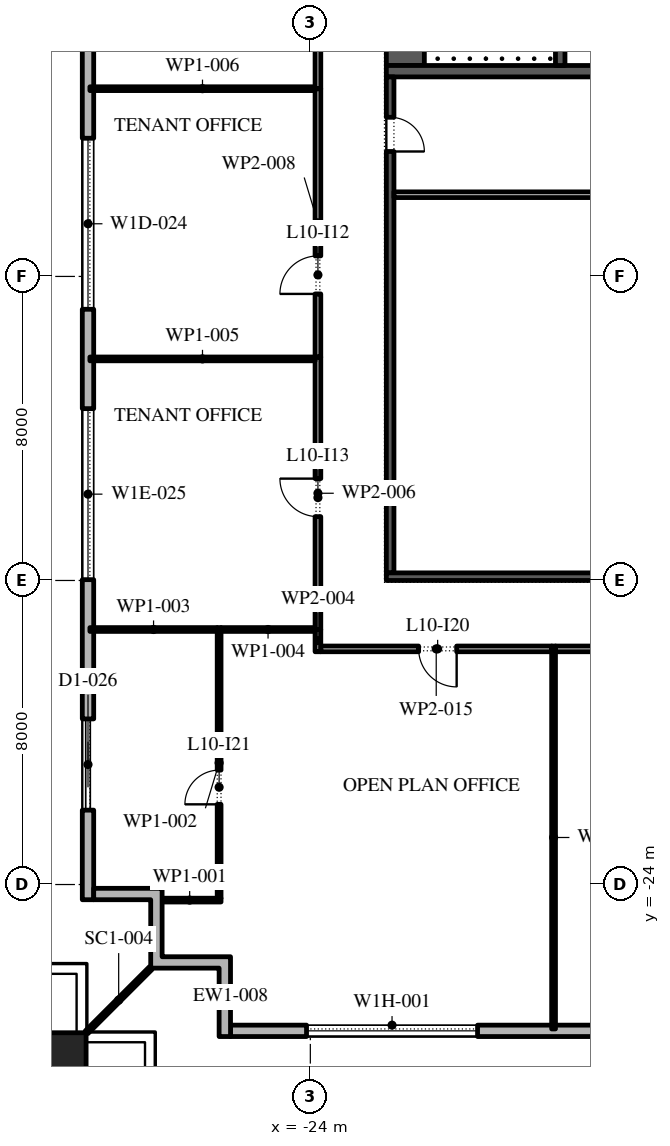
"""IFC4 building model, lengths in metres.
Left out: names, types, materials, properties, quantities, classifications, styles, units other than length and angle.
Written with IfcOpenShell. Run it as: python <this file> out.ifc"""

import sys

from ifc_helpers import new_model, si_unit, direction, frame, frame_2d, origin, origin_2d, place, context, subcontext, project, spatial, polyline, rectangle, outline, extrude, element, fill, save


model = new_model("IFC4")
c1 = context("Model", 3, precision=1e-05, world=origin(), true_north=direction((0.0, 1.0)))
c2 = subcontext(c1, "Body", "Model", "MODEL_VIEW")
j1 = project(units=[si_unit("LENGTHUNIT", "METRE"), si_unit("PLANEANGLEUNIT", "RADIAN")], contexts=[c1])
p1 = place(None, origin())
s1 = spatial("IfcSite", under=j1, at=p1, CompositionType="ELEMENT")
p2 = place(p1, origin())
s2 = spatial("IfcBuilding", under=s1, at=p2, CompositionType="ELEMENT")
p3 = place(p2, frame((0.0, 0.0, 52.2)))
s3 = spatial("IfcBuildingStorey", under=s2, at=p3, CompositionType="ELEMENT", Elevation=52.2)
p4 = place(p3, frame((-30.6, -28.6, 0.0), z_axis=(0.0, 0.0, 1.0), x_axis=(1.0, 0.0, 0.0)))
e1 = element("IfcColumn", 1, at=p4, inside=s3, PredefinedType="COLUMN", context=c2, shape_type="SweptSolid", body=[
    extrude(rectangle(XDim=1.4, YDim=1.4, at=origin_2d()), origin(), (0.0, 0.0, 1.0), 4.2),
])
p5 = place(p3, frame((-26.1, -27.85, 0.0), z_axis=(0.0, 0.0, 1.0), x_axis=(1.0, 0.0, 0.0)))
e2 = element("IfcWall", 2, at=p5, inside=s3, PredefinedType="STANDARD", context=c2, shape_type="SweptSolid", body=[
    extrude(rectangle(XDim=52.5, YDim=0.3, at=frame_2d((26.25, 0.0))), origin(), (0.0, 0.0, 1.0), 4.0),
])
p6 = place(p5, frame((2.0, 0.0, 0.45)))
e3 = element("IfcOpeningElement", 3, at=p6, cuts=e2, PredefinedType="OPENING", context=c2, shape_type="SweptSolid", body=[
    extrude(rectangle(XDim=4.5, YDim=2.75, at=frame_2d((2.25, 1.375))), frame((0.0, 0.16, 0.0), z_axis=(0.0, -1.0, 0.0), x_axis=(1.0, 0.0, 0.0)), (0.0, 0.0, 1.0), 0.32),
])
p7 = place(p5, frame((10.65, 0.0, 0.45)))
e4 = element("IfcOpeningElement", 4, at=p7, cuts=e2, PredefinedType="OPENING", context=c2, shape_type="SweptSolid", body=[
    extrude(rectangle(XDim=4.5, YDim=2.75, at=frame_2d((2.25, 1.375))), frame((0.0, 0.16, 0.0), z_axis=(0.0, -1.0, 0.0), x_axis=(1.0, 0.0, 0.0)), (0.0, 0.0, 1.0), 0.32),
])
p8 = place(p5, frame((20.5, 0.0, 0.0)))
e5 = element("IfcOpeningElement", 5, at=p8, cuts=e2, PredefinedType="OPENING", context=c2, shape_type="SweptSolid", body=[
    extrude(rectangle(XDim=2.4, YDim=3.5, at=frame_2d((1.2, 1.75))), frame((0.0, 0.16, 0.0), z_axis=(0.0, -1.0, 0.0), x_axis=(1.0, 0.0, 0.0)), (0.0, 0.0, 1.0), 0.32),
])
p9 = place(p5, frame((28.25, 0.0, 0.45)))
e6 = element("IfcOpeningElement", 6, at=p9, cuts=e2, PredefinedType="OPENING", context=c2, shape_type="SweptSolid", body=[
    extrude(rectangle(XDim=4.5, YDim=2.75, at=frame_2d((2.25, 1.375))), frame((0.0, 0.16, 0.0), z_axis=(0.0, -1.0, 0.0), x_axis=(1.0, 0.0, 0.0)), (0.0, 0.0, 1.0), 0.32),
])
p10 = place(p5, frame((37.05, 0.0, 0.45)))
e7 = element("IfcOpeningElement", 7, at=p10, cuts=e2, PredefinedType="OPENING", context=c2, shape_type="SweptSolid", body=[
    extrude(rectangle(XDim=4.5, YDim=2.75, at=frame_2d((2.25, 1.375))), frame((0.0, 0.16, 0.0), z_axis=(0.0, -1.0, 0.0), x_axis=(1.0, 0.0, 0.0)), (0.0, 0.0, 1.0), 0.32),
])
p11 = place(p5, frame((45.85, 0.0, 0.45)))
e8 = element("IfcOpeningElement", 8, at=p11, cuts=e2, PredefinedType="OPENING", context=c2, shape_type="SweptSolid", body=[
    extrude(rectangle(XDim=4.5, YDim=2.75, at=frame_2d((2.25, 1.375))), frame((0.0, 0.16, 0.0), z_axis=(0.0, -1.0, 0.0), x_axis=(1.0, 0.0, 0.0)), (0.0, 0.0, 1.0), 0.32),
])
p12 = place(p3, frame((-29.85, 25.1, 0.0), z_axis=(0.0, 0.0, 1.0), x_axis=(0.0, -1.0, 0.0)))
e9 = element("IfcWall", 9, at=p12, inside=s3, PredefinedType="STANDARD", context=c2, shape_type="SweptSolid", body=[
    extrude(rectangle(XDim=49.5, YDim=0.3, at=frame_2d((24.75, 0.0))), origin(), (0.0, 0.0, 1.0), 4.0),
])
p13 = place(p12, frame((1.157, 0.0, 0.45)))
e10 = element("IfcOpeningElement", 10, at=p13, cuts=e9, PredefinedType="OPENING", context=c2, shape_type="SweptSolid", body=[
    extrude(rectangle(XDim=4.5, YDim=2.875, at=frame_2d((2.25, 1.438))), frame((0.0, 0.16, 0.0), z_axis=(0.0, -1.0, 0.0), x_axis=(1.0, 0.0, 0.0)), (0.0, 0.0, 1.0), 0.32),
])
p14 = place(p12, frame((8.121, 0.0, 0.45)))
e11 = element("IfcOpeningElement", 11, at=p14, cuts=e9, PredefinedType="OPENING", context=c2, shape_type="SweptSolid", body=[
    extrude(rectangle(XDim=4.5, YDim=3.05, at=frame_2d((2.25, 1.525))), frame((0.0, 0.16, 0.0), z_axis=(0.0, -1.0, 0.0), x_axis=(1.0, 0.0, 0.0)), (0.0, 0.0, 1.0), 0.32),
])
p15 = place(p12, frame((16.286, 0.0, 0.0)))
e12 = element("IfcOpeningElement", 12, at=p15, cuts=e9, PredefinedType="OPENING", context=c2, shape_type="SweptSolid", body=[
    extrude(rectangle(XDim=2.4, YDim=3.325, at=frame_2d((1.2, 1.663))), frame((0.0, 0.16, 0.0), z_axis=(0.0, -1.0, 0.0), x_axis=(1.0, 0.0, 0.0)), (0.0, 0.0, 1.0), 0.32),
])
p16 = place(p12, frame((22.35, 0.0, 0.45)))
e13 = element("IfcOpeningElement", 13, at=p16, cuts=e9, PredefinedType="OPENING", context=c2, shape_type="SweptSolid", body=[
    extrude(rectangle(XDim=4.5, YDim=2.875, at=frame_2d((2.25, 1.438))), frame((0.0, 0.16, 0.0), z_axis=(0.0, -1.0, 0.0), x_axis=(1.0, 0.0, 0.0)), (0.0, 0.0, 1.0), 0.32),
])
p17 = place(p12, frame((29.464, 0.0, 0.45)))
e14 = element("IfcOpeningElement", 14, at=p17, cuts=e9, PredefinedType="OPENING", context=c2, shape_type="SweptSolid", body=[
    extrude(rectangle(XDim=4.5, YDim=2.875, at=frame_2d((2.25, 1.438))), frame((0.0, 0.16, 0.0), z_axis=(0.0, -1.0, 0.0), x_axis=(1.0, 0.0, 0.0)), (0.0, 0.0, 1.0), 0.32),
])
p18 = place(p12, frame((36.579, 0.0, 0.45)))
e15 = element("IfcOpeningElement", 15, at=p18, cuts=e9, PredefinedType="OPENING", context=c2, shape_type="SweptSolid", body=[
    extrude(rectangle(XDim=4.5, YDim=2.825, at=frame_2d((2.25, 1.413))), frame((0.0, 0.16, 0.0), z_axis=(0.0, -1.0, 0.0), x_axis=(1.0, 0.0, 0.0)), (0.0, 0.0, 1.0), 0.32),
])
p19 = place(p12, frame((44.743, 0.0, 0.0)))
e16 = element("IfcOpeningElement", 16, at=p19, cuts=e9, PredefinedType="OPENING", context=c2, shape_type="SweptSolid", body=[
    extrude(rectangle(XDim=2.4, YDim=3.5, at=frame_2d((1.2, 1.75))), frame((0.0, 0.16, 0.0), z_axis=(0.0, -1.0, 0.0), x_axis=(1.0, 0.0, 0.0)), (0.0, 0.0, 1.0), 0.32),
])
p20 = place(p3, origin())
e17 = element("IfcWall", 17, at=p20, inside=s3, PredefinedType="STANDARD", context=c2, shape_type="SweptSolid", body=[
    extrude(outline(polyline([(-26.4, -26.2), (-28.2, -26.2), (-28.2, -24.4), (-29.7, -24.4), (-29.7, -24.1), (-27.9, -24.1), (-27.9, -25.9), (-26.1, -25.9), (-26.1, -28.0), (-26.4, -28.0), (-26.4, -26.2)])), origin(), (0.0, 0.0, 1.0), 4.0),
])
p21 = place(p3, frame((-28.2, -26.2, -0.05), z_axis=(0.0, 0.0, 1.0), x_axis=(-0.707106781187, -0.707106781187, 0.0)))
e18 = element("IfcWall", 18, at=p21, inside=s3, PredefinedType="STANDARD", context=c2, shape_type="SweptSolid", body=[
    extrude(rectangle(XDim=2.385, YDim=0.1, at=frame_2d((1.192, 0.0))), origin(), (0.0, 0.0, 1.0), 4.05),
])
p22 = place(p3, frame((-21.5, -2.45, 0.0), z_axis=(0.0, 0.0, 1.0), x_axis=(0.0, 1.0, 0.0)))
e19 = element("IfcWall", 19, at=p22, inside=s3, PredefinedType="SHEAR", context=c2, shape_type="SweptSolid", body=[
    extrude(rectangle(XDim=27.9, YDim=1.0, at=frame_2d((13.95, 0.0))), origin(), (0.0, 0.0, 1.0), 4.0),
])
p23 = place(p22, frame((5.05, 0.0, 0.0)))
e20 = element("IfcOpeningElement", 20, at=p23, cuts=e19, PredefinedType="OPENING", context=c2, shape_type="SweptSolid", body=[
    extrude(rectangle(XDim=1.2, YDim=2.1, at=frame_2d((0.6, 1.05))), frame((0.0, 0.51, 0.0), z_axis=(0.0, -1.0, 0.0), x_axis=(1.0, 0.0, 0.0)), (0.0, 0.0, 1.0), 1.02),
])
p24 = place(p22, frame((21.65, 0.0, 0.0)))
e21 = element("IfcOpeningElement", 21, at=p24, cuts=e19, PredefinedType="OPENING", context=c2, shape_type="SweptSolid", body=[
    extrude(rectangle(XDim=1.2, YDim=2.1, at=frame_2d((0.6, 1.05))), frame((0.0, 0.51, 0.0), z_axis=(0.0, -1.0, 0.0), x_axis=(1.0, 0.0, 0.0)), (0.0, 0.0, 1.0), 1.02),
])
p25 = place(p3, frame((-22.0, -2.6, 0.0), z_axis=(0.0, 0.0, 1.0), x_axis=(1.0, 0.0, 0.0)))
e22 = element("IfcWall", 22, at=p25, inside=s3, PredefinedType="SHEAR", context=c2, shape_type="SweptSolid", body=[
    extrude(rectangle(XDim=12.0, YDim=0.3, at=frame_2d((6.0, 0.0))), origin(), (0.0, 0.0, 1.0), 4.0),
])
p26 = place(p3, frame((-17.425, -2.45, 0.0), z_axis=(0.0, 0.0, 1.0), x_axis=(0.0, 1.0, 0.0)))
e23 = element("IfcWall", 23, at=p26, inside=s3, PredefinedType="SHEAR", context=c2, shape_type="SweptSolid", body=[
    extrude(rectangle(XDim=6.3, YDim=0.25, at=frame_2d((3.15, 0.0))), origin(), (0.0, 0.0, 1.0), 4.0),
])
p27 = place(p26, frame((5.05, 0.0, 0.0)))
e24 = element("IfcOpeningElement", 24, at=p27, cuts=e23, PredefinedType="OPENING", context=c2, shape_type="SweptSolid", body=[
    extrude(rectangle(XDim=1.2, YDim=2.1, at=frame_2d((0.6, 1.05))), frame((0.0, 0.135, 0.0), z_axis=(0.0, -1.0, 0.0), x_axis=(1.0, 0.0, 0.0)), (0.0, 0.0, 1.0), 0.27),
])
p28 = place(p3, frame((-21.9, -15.8, 0.0), z_axis=(0.0, 0.0, 1.0), x_axis=(0.0, 1.0, 0.0)))
e25 = element("IfcWall", 25, at=p28, inside=s3, PredefinedType="SHEAR", context=c2, shape_type="SweptSolid", body=[
    extrude(rectangle(XDim=13.05, YDim=0.2, at=frame_2d((6.525, 0.0))), origin(), (0.0, 0.0, 1.0), 4.0),
])
p29 = place(p28, frame((11.087, 0.0, 0.0)))
e26 = element("IfcOpeningElement", 26, at=p29, cuts=e25, PredefinedType="OPENING", context=c2, shape_type="SweptSolid", body=[
    extrude(rectangle(XDim=0.9, YDim=2.1, at=frame_2d((0.45, 1.05))), frame((0.0, 0.11, 0.0), z_axis=(0.0, -1.0, 0.0), x_axis=(1.0, 0.0, 0.0)), (0.0, 0.0, 1.0), 0.22),
])
p30 = place(p3, frame((-22.0, -15.9, 0.0), z_axis=(0.0, 0.0, 1.0), x_axis=(1.0, 0.0, 0.0)))
e27 = element("IfcWall", 27, at=p30, inside=s3, PredefinedType="SHEAR", context=c2, shape_type="SweptSolid", body=[
    extrude(rectangle(XDim=12.0, YDim=0.2, at=frame_2d((6.0, 0.0))), origin(), (0.0, 0.0, 1.0), 4.0),
])
p31 = place(p3, frame((-21.8, -5.85, 0.0), z_axis=(0.0, 0.0, 1.0), x_axis=(1.0, 0.0, 0.0)))
e28 = element("IfcWall", 28, at=p31, inside=s3, PredefinedType="PARTITIONING", context=c2, shape_type="SweptSolid", body=[
    extrude(rectangle(XDim=11.6, YDim=0.15, at=frame_2d((5.8, 0.0))), origin(), (0.0, 0.0, 1.0), 4.0),
])
p32 = place(p3, frame((-28.0, -24.41, 0.0), z_axis=(0.0, 0.0, 1.0), x_axis=(1.0, 0.0, 0.0)))
e29 = element("IfcWall", 29, at=p32, inside=s3, PredefinedType="PARTITIONING", context=c2, shape_type="SweptSolid", body=[
    extrude(rectangle(XDim=1.65, YDim=0.1, at=frame_2d((0.825, 0.0))), origin(), (0.0, 0.0, 1.0), 4.0),
])
p33 = place(p3, frame((-26.4, -24.36, 0.0), z_axis=(0.0, 0.0, 1.0), x_axis=(0.0, 1.0, 0.0)))
e30 = element("IfcWall", 30, at=p33, inside=s3, PredefinedType="PARTITIONING", context=c2, shape_type="SweptSolid", body=[
    extrude(rectangle(XDim=7.12, YDim=0.1, at=frame_2d((3.56, 0.0))), origin(), (0.0, 0.0, 1.0), 4.0),
])
p34 = place(p33, frame((2.47, 0.0, 0.0)))
e31 = element("IfcOpeningElement", 31, at=p34, cuts=e30, PredefinedType="OPENING", context=c2, shape_type="SweptSolid", body=[
    extrude(rectangle(XDim=0.9, YDim=2.1, at=frame_2d((0.45, 1.05))), frame((0.0, 0.06, 0.0), z_axis=(0.0, -1.0, 0.0), x_axis=(1.0, 0.0, 0.0)), (0.0, 0.0, 1.0), 0.12),
])
p35 = place(p3, frame((-26.45, -17.29, 0.0), z_axis=(0.0, 0.0, 1.0), x_axis=(-1.0, 0.0, 0.0)))
e32 = element("IfcWall", 32, at=p35, inside=s3, PredefinedType="PARTITIONING", context=c2, shape_type="SweptSolid", body=[
    extrude(rectangle(XDim=3.35, YDim=0.1, at=frame_2d((1.675, 0.0))), origin(), (0.0, 0.0, 1.0), 4.0),
])
p36 = place(p3, frame((-23.8, -17.875, 0.0), z_axis=(0.0, 0.0, 1.0), x_axis=(0.0, 1.0, 0.0)))
e33 = element("IfcWall", 33, at=p36, inside=s3, PredefinedType="PARTITIONING", context=c2, shape_type="SweptSolid", body=[
    extrude(rectangle(XDim=0.585, YDim=0.15, at=frame_2d((0.292, 0.0))), origin(), (0.0, 0.0, 1.0), 4.0),
])
p37 = place(p3, frame((-23.875, -17.29, 0.0), z_axis=(0.0, 0.0, 1.0), x_axis=(-1.0, 0.0, 0.0)))
e34 = element("IfcWall", 34, at=p37, inside=s3, PredefinedType="PARTITIONING", context=c2, shape_type="SweptSolid", body=[
    extrude(rectangle(XDim=2.475, YDim=0.1, at=frame_2d((1.238, 0.0))), origin(), (0.0, 0.0, 1.0), 4.0),
])
p38 = place(p3, frame((-23.8, -17.29, 0.0), z_axis=(0.0, 0.0, 1.0), x_axis=(0.0, 1.0, 0.0)))
e35 = element("IfcWall", 35, at=p38, inside=s3, PredefinedType="PARTITIONING", context=c2, shape_type="SweptSolid", body=[
    extrude(rectangle(XDim=7.17, YDim=0.15, at=frame_2d((3.585, 0.0))), origin(), (0.0, 0.0, 1.0), 4.0),
])
p39 = place(p38, frame((2.97, 0.0, 0.0)))
e36 = element("IfcOpeningElement", 36, at=p39, cuts=e35, PredefinedType="OPENING", context=c2, shape_type="SweptSolid", body=[
    extrude(rectangle(XDim=1.0, YDim=2.1, at=frame_2d((0.5, 1.05))), frame((0.0, 0.085, 0.0), z_axis=(0.0, -1.0, 0.0), x_axis=(1.0, 0.0, 0.0)), (0.0, 0.0, 1.0), 0.17),
])
p40 = place(p3, frame((-23.875, -10.17, 0.0), z_axis=(0.0, 0.0, 1.0), x_axis=(-1.0, 0.0, 0.0)))
e37 = element("IfcWall", 37, at=p40, inside=s3, PredefinedType="PARTITIONING", context=c2, shape_type="SweptSolid", body=[
    extrude(rectangle(XDim=5.925, YDim=0.1, at=frame_2d((2.962, 0.0))), origin(), (0.0, 0.0, 1.0), 4.0),
])
p41 = place(p3, frame((-23.8, -10.12, 0.0), z_axis=(0.0, 0.0, 1.0), x_axis=(0.0, 1.0, 0.0)))
e38 = element("IfcWall", 38, at=p41, inside=s3, PredefinedType="PARTITIONING", context=c2, shape_type="SweptSolid", body=[
    extrude(rectangle(XDim=7.06, YDim=0.15, at=frame_2d((3.53, 0.0))), origin(), (0.0, 0.0, 1.0), 4.0),
])
p42 = place(p41, frame((1.66, 0.0, 0.0)))
e39 = element("IfcOpeningElement", 39, at=p42, cuts=e38, PredefinedType="OPENING", context=c2, shape_type="SweptSolid", body=[
    extrude(rectangle(XDim=1.0, YDim=2.1, at=frame_2d((0.5, 1.05))), frame((0.0, 0.085, 0.0), z_axis=(0.0, -1.0, 0.0), x_axis=(1.0, 0.0, 0.0)), (0.0, 0.0, 1.0), 0.17),
])
p43 = place(p3, frame((-23.875, -3.06, 0.0), z_axis=(0.0, 0.0, 1.0), x_axis=(-1.0, 0.0, 0.0)))
e40 = element("IfcWall", 40, at=p43, inside=s3, PredefinedType="PARTITIONING", context=c2, shape_type="SweptSolid", body=[
    extrude(rectangle(XDim=5.925, YDim=0.1, at=frame_2d((2.962, 0.0))), origin(), (0.0, 0.0, 1.0), 4.0),
])
p44 = place(p3, frame((-23.8, -3.06, 0.0), z_axis=(0.0, 0.0, 1.0), x_axis=(0.0, 1.0, 0.0)))
e41 = element("IfcWall", 41, at=p44, inside=s3, PredefinedType="PARTITIONING", context=c2, shape_type="SweptSolid", body=[
    extrude(rectangle(XDim=14.23, YDim=0.15, at=frame_2d((7.115, 0.0))), origin(), (0.0, 0.0, 1.0), 4.0),
])
p45 = place(p44, frame((8.08, 0.0, 0.0)))
e42 = element("IfcOpeningElement", 42, at=p45, cuts=e41, PredefinedType="OPENING", context=c2, shape_type="SweptSolid", body=[
    extrude(rectangle(XDim=1.0, YDim=2.1, at=frame_2d((0.5, 1.05))), frame((0.0, 0.085, 0.0), z_axis=(0.0, -1.0, 0.0), x_axis=(1.0, 0.0, 0.0)), (0.0, 0.0, 1.0), 0.17),
])
p46 = place(p3, frame((-17.6, -27.8, 0.0), z_axis=(0.0, 0.0, 1.0), x_axis=(0.0, 1.0, 0.0)))
e43 = element("IfcWall", 43, at=p46, inside=s3, PredefinedType="PARTITIONING", context=c2, shape_type="SweptSolid", body=[
    extrude(rectangle(XDim=10.075, YDim=0.1, at=frame_2d((5.038, 0.0))), origin(), (0.0, 0.0, 1.0), 4.0),
])
p47 = place(p3, frame((-17.65, -17.8, 0.0), z_axis=(0.0, 0.0, 1.0), x_axis=(-1.0, 0.0, 0.0)))
e44 = element("IfcWall", 44, at=p47, inside=s3, PredefinedType="PARTITIONING", context=c2, shape_type="SweptSolid", body=[
    extrude(rectangle(XDim=6.075, YDim=0.15, at=frame_2d((3.038, 0.0))), origin(), (0.0, 0.0, 1.0), 4.0),
])
p48 = place(p47, frame((2.5, 0.0, 0.0)))
e45 = element("IfcOpeningElement", 45, at=p48, cuts=e44, PredefinedType="OPENING", context=c2, shape_type="SweptSolid", body=[
    extrude(rectangle(XDim=1.0, YDim=2.1, at=frame_2d((0.5, 1.05))), frame((0.0, 0.085, 0.0), z_axis=(0.0, -1.0, 0.0), x_axis=(1.0, 0.0, 0.0)), (0.0, 0.0, 1.0), 0.17),
])
p49 = place(p3, frame((-8.85, -17.8, 0.0), z_axis=(0.0, 0.0, 1.0), x_axis=(-1.0, 0.0, 0.0)))
e46 = element("IfcWall", 46, at=p49, inside=s3, PredefinedType="PARTITIONING", context=c2, shape_type="SweptSolid", body=[
    extrude(rectangle(XDim=8.7, YDim=0.15, at=frame_2d((4.35, 0.0))), origin(), (0.0, 0.0, 1.0), 4.0),
])
p50 = place(p49, frame((5.6, 0.0, 0.0)))
e47 = element("IfcOpeningElement", 47, at=p50, cuts=e46, PredefinedType="OPENING", context=c2, shape_type="SweptSolid", body=[
    extrude(rectangle(XDim=1.0, YDim=2.1, at=frame_2d((0.5, 1.05))), frame((0.0, 0.085, 0.0), z_axis=(0.0, -1.0, 0.0), x_axis=(1.0, 0.0, 0.0)), (0.0, 0.0, 1.0), 0.17),
])
p51 = place(p6, origin())
e48 = element("IfcWindow", 48, at=p51, inside=s3, PartitioningType="DOUBLE_PANEL_VERTICAL", PredefinedType="WINDOW", context=c2, shape_type="SweptSolid", body=[
    extrude(rectangle(XDim=4.5, YDim=2.75, at=frame_2d((2.25, 1.375))), frame((0.0, 0.03, 0.0), z_axis=(0.0, -1.0, 0.0), x_axis=(1.0, 0.0, 0.0)), (0.0, 0.0, 1.0), 0.06),
])
fill(e3, e48)
p52 = place(p17, origin())
e49 = element("IfcWindow", 49, at=p52, inside=s3, PartitioningType="DOUBLE_PANEL_VERTICAL", PredefinedType="WINDOW", context=c2, shape_type="SweptSolid", body=[
    extrude(rectangle(XDim=4.5, YDim=2.875, at=frame_2d((2.25, 1.438))), frame((0.0, 0.03, 0.0), z_axis=(0.0, -1.0, 0.0), x_axis=(1.0, 0.0, 0.0)), (0.0, 0.0, 1.0), 0.06),
])
fill(e14, e49)
p53 = place(p18, origin())
e50 = element("IfcWindow", 50, at=p53, inside=s3, PartitioningType="DOUBLE_PANEL_VERTICAL", PredefinedType="WINDOW", context=c2, shape_type="SweptSolid", body=[
    extrude(rectangle(XDim=4.5, YDim=2.825, at=frame_2d((2.25, 1.413))), frame((0.0, 0.03, 0.0), z_axis=(0.0, -1.0, 0.0), x_axis=(1.0, 0.0, 0.0)), (0.0, 0.0, 1.0), 0.06),
])
fill(e15, e50)
p54 = place(p19, origin())
e51 = element("IfcDoor", 51, at=p54, inside=s3, OperationType="DOUBLE_DOOR_SLIDING", PredefinedType="DOOR", context=c2, shape_type="SweptSolid", body=[
    extrude(rectangle(XDim=2.4, YDim=3.5, at=frame_2d((1.2, 1.75))), frame((0.0, 0.025, 0.0), z_axis=(0.0, -1.0, 0.0), x_axis=(1.0, 0.0, 0.0)), (0.0, 0.0, 1.0), 0.05),
])
fill(e16, e51)
p55 = place(p29, frame((0.9, -0.15, 0.0), z_axis=(0.0, 0.0, 1.0), x_axis=(-1.0, 0.0, 0.0)))
e52 = element("IfcDoor", 52, at=p55, inside=s3, OperationType="SINGLE_SWING_LEFT", PredefinedType="DOOR", context=c2, shape_type="SweptSolid", body=[
    extrude(rectangle(XDim=0.9, YDim=2.1, at=frame_2d((0.45, 1.05))), frame((0.0, -0.05, 0.0), z_axis=(0.0, -1.0, 0.0), x_axis=(1.0, 0.0, 0.0)), (0.0, 0.0, 1.0), 0.05),
])
fill(e26, e52)
p56 = place(p42, origin())
e53 = element("IfcDoor", 53, at=p56, inside=s3, OperationType="SINGLE_SWING_RIGHT", PredefinedType="DOOR", context=c2, shape_type="SweptSolid", body=[
    extrude(rectangle(XDim=1.0, YDim=2.1, at=frame_2d((0.5, 1.05))), frame((0.0, 0.025, 0.0), z_axis=(0.0, -1.0, 0.0), x_axis=(1.0, 0.0, 0.0)), (0.0, 0.0, 1.0), 0.05),
])
fill(e39, e53)
p57 = place(p39, origin())
e54 = element("IfcDoor", 54, at=p57, inside=s3, OperationType="SINGLE_SWING_LEFT", PredefinedType="DOOR", context=c2, shape_type="SweptSolid", body=[
    extrude(rectangle(XDim=1.0, YDim=2.1, at=frame_2d((0.5, 1.05))), frame((0.0, 0.025, 0.0), z_axis=(0.0, -1.0, 0.0), x_axis=(1.0, 0.0, 0.0)), (0.0, 0.0, 1.0), 0.05),
])
fill(e36, e54)
p58 = place(p48, origin())
e55 = element("IfcDoor", 55, at=p58, inside=s3, OperationType="SINGLE_SWING_RIGHT", PredefinedType="DOOR", context=c2, shape_type="SweptSolid", body=[
    extrude(rectangle(XDim=1.0, YDim=2.1, at=frame_2d((0.5, 1.05))), frame((0.0, 0.025, 0.0), z_axis=(0.0, -1.0, 0.0), x_axis=(1.0, 0.0, 0.0)), (0.0, 0.0, 1.0), 0.05),
])
fill(e45, e55)
p59 = place(p34, origin())
e56 = element("IfcDoor", 56, at=p59, inside=s3, OperationType="SINGLE_SWING_RIGHT", PredefinedType="DOOR", context=c2, shape_type="SweptSolid", body=[
    extrude(rectangle(XDim=0.9, YDim=2.1, at=frame_2d((0.45, 1.05))), frame((0.0, 0.025, 0.0), z_axis=(0.0, -1.0, 0.0), x_axis=(1.0, 0.0, 0.0)), (0.0, 0.0, 1.0), 0.05),
])
fill(e31, e56)
save(model, sys.argv[1])
